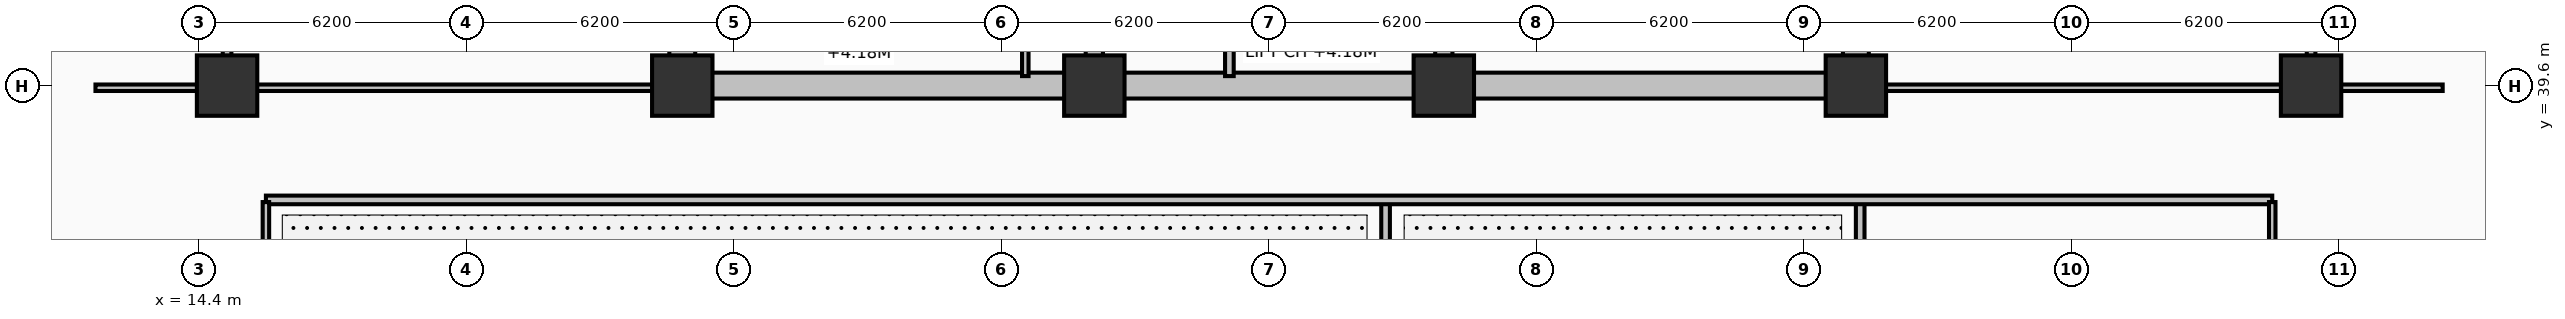
"""IFC4 building model, lengths in metres.
Left out: names, types, materials, properties, quantities, classifications, styles, units other than length and angle.
Written with IfcOpenShell. Run it as: python <this file> out.ifc"""

import sys

from ifc_helpers import new_model, si_unit, direction, frame, frame_2d, origin, origin_2d, place, context, subcontext, project, spatial, rectangle, extrude, element, fill, save


model = new_model("IFC4")
c1 = context("Model", 3, precision=1e-05, world=origin(), true_north=direction((0.0, 1.0)))
c2 = subcontext(c1, "Body", "Model", "MODEL_VIEW")
j1 = project(units=[si_unit("LENGTHUNIT", "METRE"), si_unit("PLANEANGLEUNIT", "RADIAN")], contexts=[c1])
p1 = place(None, origin())
s1 = spatial("IfcSite", under=j1, at=p1, CompositionType="ELEMENT")
p2 = place(p1, origin())
s2 = spatial("IfcBuilding", under=s1, at=p2, CompositionType="ELEMENT")
p3 = place(p2, frame((0.0, 0.0, 11.1)))
s3 = spatial("IfcBuildingStorey", under=s2, at=p3, CompositionType="ELEMENT", Elevation=11.1)
for number, where, z_axis, x_axis in (
    (1, (25.6, 39.9, 0.0), (0.0, 0.0, 1.0), (0.0, 1.0, 0.0)),
    (2, (52.8, 39.9, 0.0), (0.0, 0.0, 1.0), (0.0, 1.0, 0.0)),
):
    element("IfcWall", number, at=place(p3, frame(where, z_axis=z_axis, x_axis=x_axis)), inside=s3, PredefinedType="SHEAR", context=c2, shape_type="SweptSolid", body=[
        extrude(rectangle(XDim=5.6, YDim=0.6, at=frame_2d((2.8, 0.0))), origin(), (0.0, 0.0, 1.0), 4.5),
    ])
p4 = place(p3, frame((52.8, 39.6, 0.0), z_axis=(0.0, 0.0, 1.0), x_axis=(-1.0, 0.0, 0.0)))
e3 = element("IfcWall", 3, at=p4, inside=s3, PredefinedType="SHEAR", context=c2, shape_type="SweptSolid", body=[
    extrude(rectangle(XDim=27.2, YDim=0.6, at=frame_2d((13.6, 0.0))), origin(), (0.0, 0.0, 1.0), 4.5),
])
p5 = place(p4, frame((24.2, 0.0, 0.0)))
e4 = element("IfcOpeningElement", 4, at=p5, cuts=e3, PredefinedType="OPENING", context=c2, shape_type="SweptSolid", body=[
    extrude(rectangle(XDim=1.1, YDim=2.15, at=frame_2d((0.55, 1.075))), frame((0.0, 0.31, 0.0), z_axis=(0.0, -1.0, 0.0), x_axis=(1.0, 0.0, 0.0)), (0.0, 0.0, 1.0), 0.62),
])
p6 = place(p4, frame((15.1, 0.0, 0.0)))
e5 = element("IfcOpeningElement", 5, at=p6, cuts=e3, PredefinedType="OPENING", context=c2, shape_type="SweptSolid", body=[
    extrude(rectangle(XDim=1.2, YDim=2.15, at=frame_2d((0.6, 1.075))), frame((0.0, 0.31, 0.0), z_axis=(0.0, -1.0, 0.0), x_axis=(1.0, 0.0, 0.0)), (0.0, 0.0, 1.0), 0.62),
])
p7 = place(p4, frame((11.6, 0.0, 0.0)))
e6 = element("IfcOpeningElement", 6, at=p7, cuts=e3, PredefinedType="OPENING", context=c2, shape_type="SweptSolid", body=[
    extrude(rectangle(XDim=0.9, YDim=2.1, at=frame_2d((0.45, 1.05))), frame((0.0, 0.31, 0.0), z_axis=(0.0, -1.0, 0.0), x_axis=(1.0, 0.0, 0.0)), (0.0, 0.0, 1.0), 0.62),
])
p8 = place(p4, frame((3.6, 0.0, 0.0)))
e7 = element("IfcOpeningElement", 7, at=p8, cuts=e3, PredefinedType="OPENING", context=c2, shape_type="SweptSolid", body=[
    extrude(rectangle(XDim=1.0, YDim=2.15, at=frame_2d((0.5, 1.075))), frame((0.0, 0.31, 0.0), z_axis=(0.0, -1.0, 0.0), x_axis=(1.0, 0.0, 0.0)), (0.0, 0.0, 1.0), 0.62),
])
for number, where, z_axis, x_axis in (
    (8, (35.15, 39.9, 0.0), (0.0, 0.0, 1.0), (0.0, 1.0, 0.0)),
    (9, (43.25, 39.9, 0.0), (0.0, 0.0, 1.0), (0.0, 1.0, 0.0)),
):
    element("IfcWall", number, at=place(p3, frame(where, z_axis=z_axis, x_axis=x_axis)), inside=s3, PredefinedType="SHEAR", context=c2, shape_type="SweptSolid", body=[
        extrude(rectangle(XDim=5.6, YDim=0.4, at=frame_2d((2.8, 0.0))), origin(), (0.0, 0.0, 1.0), 4.5),
    ])
for number, where, z_axis, x_axis in (
    (10, (25.6, 39.6, 0.0), (0.0, 0.0, 1.0), (1.0, 0.0, 0.0)),
    (11, (35.15, 39.6, 0.0), (0.0, 0.0, 1.0), (1.0, 0.0, 0.0)),
    (12, (43.25, 39.6, 0.0), (0.0, 0.0, 1.0), (1.0, 0.0, 0.0)),
    (13, (52.8, 39.6, 0.0), (0.0, 0.0, 1.0), (1.0, 0.0, 0.0)),
    (14, (15.05, 39.6, 0.0), (0.0, 0.0, 1.0), (1.0, 0.0, 0.0)),
    (15, (63.35, 39.6, 0.0), (0.0, 0.0, 1.0), (1.0, 0.0, 0.0)),
):
    element("IfcColumn", number, at=place(p3, frame(where, z_axis=z_axis, x_axis=x_axis)), inside=s3, PredefinedType="COLUMN", context=c2, shape_type="SweptSolid", body=[
        extrude(rectangle(XDim=1.4, YDim=1.4, at=origin_2d()), origin(), (0.0, 0.0, 1.0), 4.5),
    ])
p9 = place(p3, frame((33.55, 39.82, 0.0), z_axis=(0.0, 0.0, 1.0), x_axis=(0.0, 1.0, 0.0)))
e16 = element("IfcWall", 16, at=p9, inside=s3, PredefinedType="PARTITIONING", context=c2, shape_type="SweptSolid", body=[
    extrude(rectangle(XDim=2.13, YDim=0.15, at=frame_2d((1.065, 0.0))), origin(), (0.0, 0.0, 1.0), 3.42),
])
p10 = place(p9, frame((0.55, 0.0, 0.0)))
e17 = element("IfcOpeningElement", 17, at=p10, cuts=e16, PredefinedType="OPENING", context=c2, shape_type="SweptSolid", body=[
    extrude(rectangle(XDim=0.85, YDim=2.05, at=frame_2d((0.425, 1.025))), frame((0.0, 0.085, 0.0), z_axis=(0.0, -1.0, 0.0), x_axis=(1.0, 0.0, 0.0)), (0.0, 0.0, 1.0), 0.17),
])
p11 = place(p3, frame((38.28, 39.82, 0.0), z_axis=(0.0, 0.0, 1.0), x_axis=(0.0, 1.0, 0.0)))
e18 = element("IfcWall", 18, at=p11, inside=s3, PredefinedType="PARTITIONING", context=c2, shape_type="SweptSolid", body=[
    extrude(rectangle(XDim=2.73, YDim=0.2, at=frame_2d((1.365, 0.0))), origin(), (0.0, 0.0, 1.0), 3.42),
])
for number, where, z_axis, x_axis in (
    (19, (41.9, 19.5, 0.0), (0.0, 0.0, 1.0), (0.0, 1.0, 0.0)),
    (20, (52.9, 19.5, 0.0), (0.0, 0.0, 1.0), (0.0, 1.0, 0.0)),
):
    element("IfcWall", number, at=place(p3, frame(where, z_axis=z_axis, x_axis=x_axis)), inside=s3, PredefinedType="PARTITIONING", context=c2, shape_type="SweptSolid", body=[
        extrude(rectangle(XDim=17.4, YDim=0.2, at=frame_2d((8.7, 0.0))), origin(), (0.0, 0.0, 1.0), 3.42),
    ])
p12 = place(p3, frame((62.45, 36.95, 0.0), z_axis=(0.0, 0.0, 1.0), x_axis=(-1.0, 0.0, 0.0)))
e21 = element("IfcWall", 21, at=p12, inside=s3, PredefinedType="PARTITIONING", context=c2, shape_type="SweptSolid", body=[
    extrude(rectangle(XDim=46.5, YDim=0.2, at=frame_2d((23.25, 0.0))), origin(), (0.0, 0.0, 1.0), 3.42),
])
p13 = place(p12, frame((23.25, 0.0, 0.0)))
e22 = element("IfcOpeningElement", 22, at=p13, cuts=e21, PredefinedType="OPENING", context=c2, shape_type="SweptSolid", body=[
    extrude(rectangle(XDim=1.2, YDim=2.15, at=frame_2d((0.6, 1.075))), frame((0.0, 0.11, 0.0), z_axis=(0.0, -1.0, 0.0), x_axis=(1.0, 0.0, 0.0)), (0.0, 0.0, 1.0), 0.22),
])
p14 = place(p12, frame((12.25, 0.0, 0.0)))
e23 = element("IfcOpeningElement", 23, at=p14, cuts=e21, PredefinedType="OPENING", context=c2, shape_type="SweptSolid", body=[
    extrude(rectangle(XDim=1.2, YDim=2.15, at=frame_2d((0.6, 1.075))), frame((0.0, 0.11, 0.0), z_axis=(0.0, -1.0, 0.0), x_axis=(1.0, 0.0, 0.0)), (0.0, 0.0, 1.0), 0.22),
])
p15 = place(p12, frame((2.65, 0.0, 0.0)))
e24 = element("IfcOpeningElement", 24, at=p15, cuts=e21, PredefinedType="OPENING", context=c2, shape_type="SweptSolid", body=[
    extrude(rectangle(XDim=1.2, YDim=2.15, at=frame_2d((0.6, 1.075))), frame((0.0, 0.11, 0.0), z_axis=(0.0, -1.0, 0.0), x_axis=(1.0, 0.0, 0.0)), (0.0, 0.0, 1.0), 0.22),
])
for number, where, z_axis, x_axis in (
    (25, (15.95, 19.5, 0.0), (0.0, 0.0, 1.0), (0.0, 1.0, 0.0)),
    (26, (62.45, 19.5, 0.0), (0.0, 0.0, 1.0), (0.0, 1.0, 0.0)),
):
    element("IfcWall", number, at=place(p3, frame(where, z_axis=z_axis, x_axis=x_axis)), inside=s3, PredefinedType="PARTITIONING", context=c2, shape_type="SweptSolid", body=[
        extrude(rectangle(XDim=17.4, YDim=0.15, at=frame_2d((8.7, 0.0))), origin(), (0.0, 0.0, 1.0), 3.42),
    ])
p16 = place(p3, frame((15.05, 39.6, 0.0), z_axis=(0.0, 0.0, 1.0), x_axis=(0.0, 1.0, 0.0)))
e27 = element("IfcWall", 27, at=p16, inside=s3, PredefinedType="PARTITIONING", context=c2, shape_type="SweptSolid", body=[
    extrude(rectangle(XDim=16.4, YDim=0.2, at=frame_2d((8.2, 0.0))), origin(), (0.0, 0.0, 1.0), 3.42),
])
p17 = place(p16, frame((3.4, 0.0, 0.0)))
e28 = element("IfcOpeningElement", 28, at=p17, cuts=e27, PredefinedType="OPENING", context=c2, shape_type="SweptSolid", body=[
    extrude(rectangle(XDim=1.0, YDim=2.15, at=frame_2d((0.5, 1.075))), frame((0.0, 0.11, 0.0), z_axis=(0.0, -1.0, 0.0), x_axis=(1.0, 0.0, 0.0)), (0.0, 0.0, 1.0), 0.22),
])
p18 = place(p3, frame((25.25, 39.55, 0.0), z_axis=(0.0, 0.0, 1.0), x_axis=(-1.0, 0.0, 0.0)))
e29 = element("IfcWall", 29, at=p18, inside=s3, PredefinedType="PARTITIONING", context=c2, shape_type="SweptSolid", body=[
    extrude(rectangle(XDim=13.25, YDim=0.15, at=frame_2d((6.625, 0.0))), origin(), (0.0, 0.0, 1.0), 3.42),
])
p19 = place(p18, frame((4.2, 0.0, 0.0)))
e30 = element("IfcOpeningElement", 30, at=p19, cuts=e29, PredefinedType="OPENING", context=c2, shape_type="SweptSolid", body=[
    extrude(rectangle(XDim=1.0, YDim=2.15, at=frame_2d((0.5, 1.075))), frame((0.0, 0.085, 0.0), z_axis=(0.0, -1.0, 0.0), x_axis=(1.0, 0.0, 0.0)), (0.0, 0.0, 1.0), 0.17),
])
p20 = place(p3, frame((63.35, 39.6, 0.0), z_axis=(0.0, 0.0, 1.0), x_axis=(0.0, 1.0, 0.0)))
e31 = element("IfcWall", 31, at=p20, inside=s3, PredefinedType="PARTITIONING", context=c2, shape_type="SweptSolid", body=[
    extrude(rectangle(XDim=16.4, YDim=0.2, at=frame_2d((8.2, 0.0))), origin(), (0.0, 0.0, 1.0), 3.42),
])
p21 = place(p20, frame((3.4, 0.0, 0.0)))
e32 = element("IfcOpeningElement", 32, at=p21, cuts=e31, PredefinedType="OPENING", context=c2, shape_type="SweptSolid", body=[
    extrude(rectangle(XDim=1.0, YDim=2.15, at=frame_2d((0.5, 1.075))), frame((0.0, 0.11, 0.0), z_axis=(0.0, -1.0, 0.0), x_axis=(1.0, 0.0, 0.0)), (0.0, 0.0, 1.0), 0.22),
])
p22 = place(p3, frame((66.4, 39.55, 0.0), z_axis=(0.0, 0.0, 1.0), x_axis=(-1.0, 0.0, 0.0)))
e33 = element("IfcWall", 33, at=p22, inside=s3, PredefinedType="PARTITIONING", context=c2, shape_type="SweptSolid", body=[
    extrude(rectangle(XDim=13.25, YDim=0.15, at=frame_2d((6.625, 0.0))), origin(), (0.0, 0.0, 1.0), 3.42),
])
p23 = place(p22, frame((5.5, 0.0, 0.0)))
e34 = element("IfcOpeningElement", 34, at=p23, cuts=e33, PredefinedType="OPENING", context=c2, shape_type="SweptSolid", body=[
    extrude(rectangle(XDim=1.0, YDim=2.15, at=frame_2d((0.5, 1.075))), frame((0.0, 0.085, 0.0), z_axis=(0.0, -1.0, 0.0), x_axis=(1.0, 0.0, 0.0)), (0.0, 0.0, 1.0), 0.17),
])
p24 = place(p10, origin())
e35 = element("IfcDoor", 35, at=p24, inside=s3, OperationType="SINGLE_SWING_LEFT", PredefinedType="TRAPDOOR", context=c2, shape_type="SweptSolid", body=[
    extrude(rectangle(XDim=0.85, YDim=2.05, at=frame_2d((0.425, 1.025))), frame((0.0, 0.025, 0.0), z_axis=(0.0, -1.0, 0.0), x_axis=(1.0, 0.0, 0.0)), (0.0, 0.0, 1.0), 0.05),
])
fill(e17, e35)
p25 = place(p13, origin())
e36 = element("IfcDoor", 36, at=p25, inside=s3, OperationType="SINGLE_SWING_RIGHT", PredefinedType="DOOR", context=c2, shape_type="SweptSolid", body=[
    extrude(rectangle(XDim=1.2, YDim=2.15, at=frame_2d((0.6, 1.075))), frame((0.0, 0.025, 0.0), z_axis=(0.0, -1.0, 0.0), x_axis=(1.0, 0.0, 0.0)), (0.0, 0.0, 1.0), 0.05),
])
fill(e22, e36)
p26 = place(p14, origin())
e37 = element("IfcDoor", 37, at=p26, inside=s3, OperationType="SINGLE_SWING_LEFT", PredefinedType="DOOR", context=c2, shape_type="SweptSolid", body=[
    extrude(rectangle(XDim=1.2, YDim=2.15, at=frame_2d((0.6, 1.075))), frame((0.0, 0.025, 0.0), z_axis=(0.0, -1.0, 0.0), x_axis=(1.0, 0.0, 0.0)), (0.0, 0.0, 1.0), 0.05),
])
fill(e23, e37)
p27 = place(p15, origin())
e38 = element("IfcDoor", 38, at=p27, inside=s3, OperationType="SINGLE_SWING_RIGHT", PredefinedType="DOOR", context=c2, shape_type="SweptSolid", body=[
    extrude(rectangle(XDim=1.2, YDim=2.15, at=frame_2d((0.6, 1.075))), frame((0.0, 0.025, 0.0), z_axis=(0.0, -1.0, 0.0), x_axis=(1.0, 0.0, 0.0)), (0.0, 0.0, 1.0), 0.05),
])
fill(e24, e38)
p28 = place(p19, origin())
e39 = element("IfcDoor", 39, at=p28, inside=s3, OperationType="SINGLE_SWING_RIGHT", PredefinedType="DOOR", context=c2, shape_type="SweptSolid", body=[
    extrude(rectangle(XDim=1.0, YDim=2.15, at=frame_2d((0.5, 1.075))), frame((0.0, 0.025, 0.0), z_axis=(0.0, -1.0, 0.0), x_axis=(1.0, 0.0, 0.0)), (0.0, 0.0, 1.0), 0.05),
])
fill(e30, e39)
p29 = place(p23, origin())
e40 = element("IfcDoor", 40, at=p29, inside=s3, OperationType="SINGLE_SWING_LEFT", PredefinedType="DOOR", context=c2, shape_type="SweptSolid", body=[
    extrude(rectangle(XDim=1.0, YDim=2.15, at=frame_2d((0.5, 1.075))), frame((0.0, 0.025, 0.0), z_axis=(0.0, -1.0, 0.0), x_axis=(1.0, 0.0, 0.0)), (0.0, 0.0, 1.0), 0.05),
])
fill(e34, e40)
p30 = place(p5, origin())
e41 = element("IfcDoor", 41, at=p30, inside=s3, OperationType="SINGLE_SWING_LEFT", PredefinedType="DOOR", context=c2, shape_type="SweptSolid", body=[
    extrude(rectangle(XDim=1.1, YDim=2.15, at=frame_2d((0.55, 1.075))), frame((0.0, 0.025, 0.0), z_axis=(0.0, -1.0, 0.0), x_axis=(1.0, 0.0, 0.0)), (0.0, 0.0, 1.0), 0.05),
])
fill(e4, e41)
p31 = place(p6, origin())
e42 = element("IfcDoor", 42, at=p31, inside=s3, OperationType="SINGLE_SWING_RIGHT", PredefinedType="DOOR", context=c2, shape_type="SweptSolid", body=[
    extrude(rectangle(XDim=1.2, YDim=2.15, at=frame_2d((0.6, 1.075))), frame((0.0, 0.025, 0.0), z_axis=(0.0, -1.0, 0.0), x_axis=(1.0, 0.0, 0.0)), (0.0, 0.0, 1.0), 0.05),
])
fill(e5, e42)
p32 = place(p7, origin())
e43 = element("IfcDoor", 43, at=p32, inside=s3, OperationType="SINGLE_SWING_LEFT", PredefinedType="DOOR", context=c2, shape_type="SweptSolid", body=[
    extrude(rectangle(XDim=0.9, YDim=2.1, at=frame_2d((0.45, 1.05))), frame((0.0, 0.025, 0.0), z_axis=(0.0, -1.0, 0.0), x_axis=(1.0, 0.0, 0.0)), (0.0, 0.0, 1.0), 0.05),
])
fill(e6, e43)
p33 = place(p8, origin())
e44 = element("IfcDoor", 44, at=p33, inside=s3, OperationType="SINGLE_SWING_LEFT", PredefinedType="DOOR", context=c2, shape_type="SweptSolid", body=[
    extrude(rectangle(XDim=1.0, YDim=2.15, at=frame_2d((0.5, 1.075))), frame((0.0, 0.025, 0.0), z_axis=(0.0, -1.0, 0.0), x_axis=(1.0, 0.0, 0.0)), (0.0, 0.0, 1.0), 0.05),
])
fill(e7, e44)
save(model, sys.argv[1])
